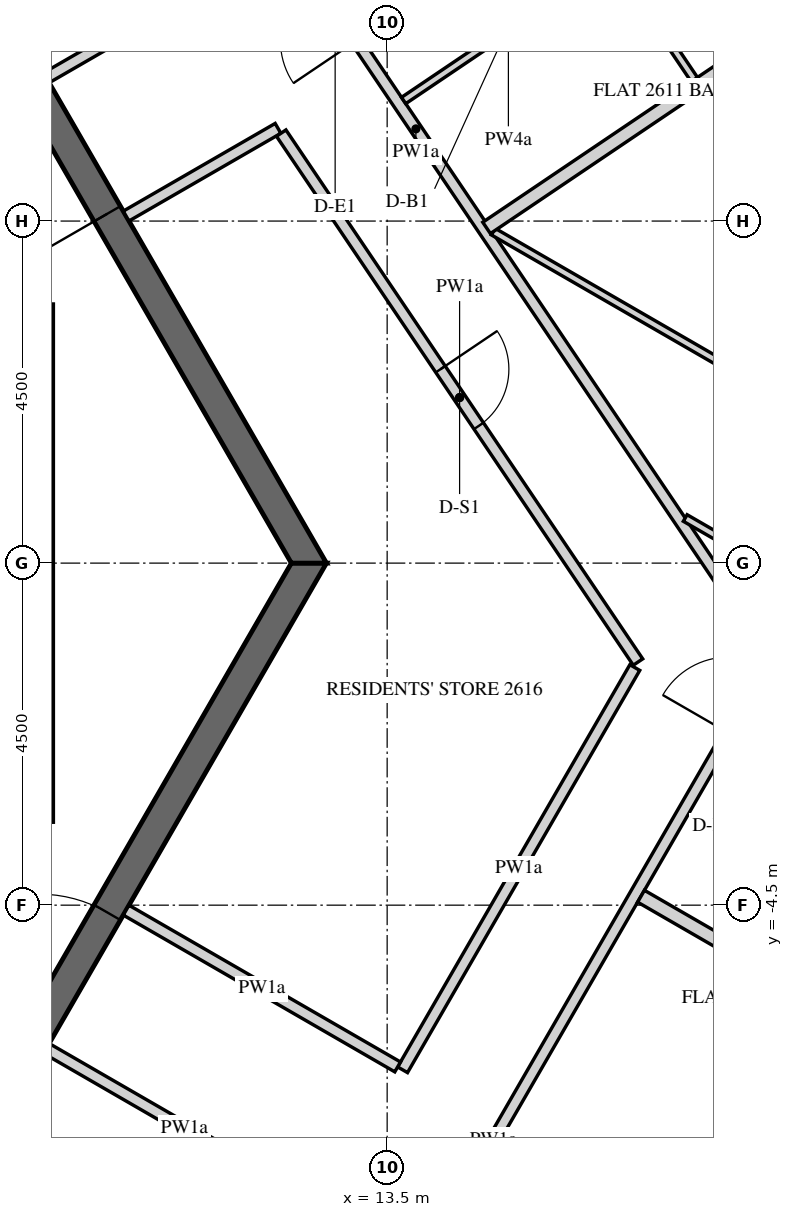
"""IFC4 building model, lengths in metres.
Left out: names, types, materials, properties, quantities, classifications, styles, units other than length and angle.
Written with IfcOpenShell. Run it as: python <this file> out.ifc"""

import sys

from ifc_helpers import new_model, si_unit, direction, frame, frame_2d, origin, place, context, subcontext, project, spatial, polyline, rectangle, outline, extrude, element, fill, save


model = new_model("IFC4")
c1 = context("Model", 3, precision=1e-05, world=origin(), true_north=direction((0.0, 1.0)))
c2 = subcontext(c1, "Body", "Model", "MODEL_VIEW")
j1 = project(units=[si_unit("LENGTHUNIT", "METRE"), si_unit("PLANEANGLEUNIT", "RADIAN")], contexts=[c1])
p1 = place(None, origin())
s1 = spatial("IfcSite", under=j1, at=p1, CompositionType="ELEMENT")
p2 = place(p1, origin())
s2 = spatial("IfcBuilding", under=s1, at=p2, CompositionType="ELEMENT")
p3 = place(p2, frame((0.0, 0.0, 334.2)))
s3 = spatial("IfcBuildingStorey", under=s2, at=p3, CompositionType="ELEMENT", Elevation=334.2)
p4 = place(p3, frame((16.451, -23.005, -0.15), z_axis=(0.0, 0.0, 1.0), x_axis=(0.500003737743, 0.866023245787, 0.0)))
e1 = element("IfcWall", 1, at=p4, inside=s3, PredefinedType="SOLIDWALL", context=c2, shape_type="SweptSolid", body=[
    extrude(outline(polyline([(-0.021, -0.25), (25.468, -0.25), (25.421, 0.25), (0.021, 0.25), (-0.021, -0.25)])), origin(), (0.0, 0.0, 1.0), 3.75),
])
p5 = place(p4, frame((2.522, 0.0, 0.75)))
e2 = element("IfcOpeningElement", 2, at=p5, cuts=e1, PredefinedType="OPENING", context=c2, shape_type="SweptSolid", body=[
    extrude(rectangle(XDim=2.4, YDim=2.7, at=frame_2d((1.2, 1.35))), frame((0.0, 0.26, 0.0), z_axis=(0.0, -1.0, 0.0), x_axis=(1.0, 0.0, 0.0)), (0.0, 0.0, 1.0), 0.52),
])
p6 = place(p4, frame((6.122, 0.0, 0.75)))
e3 = element("IfcOpeningElement", 3, at=p6, cuts=e1, PredefinedType="OPENING", context=c2, shape_type="SweptSolid", body=[
    extrude(rectangle(XDim=2.4, YDim=2.7, at=frame_2d((1.2, 1.35))), frame((0.0, 0.26, 0.0), z_axis=(0.0, -1.0, 0.0), x_axis=(1.0, 0.0, 0.0)), (0.0, 0.0, 1.0), 0.52),
])
p7 = place(p4, frame((9.722, 0.0, 0.75)))
e4 = element("IfcOpeningElement", 4, at=p7, cuts=e1, PredefinedType="OPENING", context=c2, shape_type="SweptSolid", body=[
    extrude(rectangle(XDim=2.4, YDim=2.7, at=frame_2d((1.2, 1.35))), frame((0.0, 0.26, 0.0), z_axis=(0.0, -1.0, 0.0), x_axis=(1.0, 0.0, 0.0)), (0.0, 0.0, 1.0), 0.52),
])
p8 = place(p4, frame((13.323, 0.0, 0.75)))
e5 = element("IfcOpeningElement", 5, at=p8, cuts=e1, PredefinedType="OPENING", context=c2, shape_type="SweptSolid", body=[
    extrude(rectangle(XDim=2.4, YDim=2.7, at=frame_2d((1.2, 1.35))), frame((0.0, 0.26, 0.0), z_axis=(0.0, -1.0, 0.0), x_axis=(1.0, 0.0, 0.0)), (0.0, 0.0, 1.0), 0.52),
])
p9 = place(p4, frame((16.922, 0.0, 0.75)))
e6 = element("IfcOpeningElement", 6, at=p9, cuts=e1, PredefinedType="OPENING", context=c2, shape_type="SweptSolid", body=[
    extrude(rectangle(XDim=2.4, YDim=2.7, at=frame_2d((1.2, 1.35))), frame((0.0, 0.26, 0.0), z_axis=(0.0, -1.0, 0.0), x_axis=(1.0, 0.0, 0.0)), (0.0, 0.0, 1.0), 0.52),
])
p10 = place(p4, frame((20.522, 0.0, 0.75)))
e7 = element("IfcOpeningElement", 7, at=p10, cuts=e1, PredefinedType="OPENING", context=c2, shape_type="SweptSolid", body=[
    extrude(rectangle(XDim=2.4, YDim=2.7, at=frame_2d((1.2, 1.35))), frame((0.0, 0.26, 0.0), z_axis=(0.0, -1.0, 0.0), x_axis=(1.0, 0.0, 0.0)), (0.0, 0.0, 1.0), 0.52),
])
p11 = place(p3, frame((26.706, 2.879, -0.15), z_axis=(0.0, 0.0, 1.0), x_axis=(-0.559197891507, 0.829034208061, 0.0)))
e8 = element("IfcWall", 8, at=p11, inside=s3, PredefinedType="SOLIDWALL", context=c2, shape_type="SweptSolid", body=[
    extrude(outline(polyline([(0.25, -0.25), (22.795, -0.25), (23.295, 0.25), (-0.25, 0.25), (0.25, -0.25)])), origin(), (0.0, 0.0, 1.0), 3.75),
])
p12 = place(p11, frame((1.323, 0.0, 1.05)))
e9 = element("IfcOpeningElement", 9, at=p12, cuts=e8, PredefinedType="OPENING", context=c2, shape_type="SweptSolid", body=[
    extrude(rectangle(XDim=0.9, YDim=1.5, at=frame_2d((0.45, 0.75))), frame((0.0, 0.26, 0.0), z_axis=(0.0, -1.0, 0.0), x_axis=(1.0, 0.0, 0.0)), (0.0, 0.0, 1.0), 0.52),
])
p13 = place(p11, frame((2.522, 0.0, 0.15)))
e10 = element("IfcOpeningElement", 10, at=p13, cuts=e8, PredefinedType="OPENING", context=c2, shape_type="SweptSolid", body=[
    extrude(rectangle(XDim=1.2, YDim=2.4, at=frame_2d((0.6, 1.2))), frame((0.0, 0.26, 0.0), z_axis=(0.0, -1.0, 0.0), x_axis=(1.0, 0.0, 0.0)), (0.0, 0.0, 1.0), 0.52),
])
p14 = place(p11, frame((4.922, 0.0, 1.05)))
e11 = element("IfcOpeningElement", 11, at=p14, cuts=e8, PredefinedType="OPENING", context=c2, shape_type="SweptSolid", body=[
    extrude(rectangle(XDim=0.9, YDim=1.5, at=frame_2d((0.45, 0.75))), frame((0.0, 0.26, 0.0), z_axis=(0.0, -1.0, 0.0), x_axis=(1.0, 0.0, 0.0)), (0.0, 0.0, 1.0), 0.52),
])
p15 = place(p11, frame((6.122, 0.0, 0.15)))
e12 = element("IfcOpeningElement", 12, at=p15, cuts=e8, PredefinedType="OPENING", context=c2, shape_type="SweptSolid", body=[
    extrude(rectangle(XDim=1.2, YDim=2.4, at=frame_2d((0.6, 1.2))), frame((0.0, 0.26, 0.0), z_axis=(0.0, -1.0, 0.0), x_axis=(1.0, 0.0, 0.0)), (0.0, 0.0, 1.0), 0.52),
])
p16 = place(p11, frame((8.522, 0.0, 1.05)))
e13 = element("IfcOpeningElement", 13, at=p16, cuts=e8, PredefinedType="OPENING", context=c2, shape_type="SweptSolid", body=[
    extrude(rectangle(XDim=0.9, YDim=1.5, at=frame_2d((0.45, 0.75))), frame((0.0, 0.26, 0.0), z_axis=(0.0, -1.0, 0.0), x_axis=(1.0, 0.0, 0.0)), (0.0, 0.0, 1.0), 0.52),
])
p17 = place(p11, frame((9.722, 0.0, 0.15)))
e14 = element("IfcOpeningElement", 14, at=p17, cuts=e8, PredefinedType="OPENING", context=c2, shape_type="SweptSolid", body=[
    extrude(rectangle(XDim=1.2, YDim=2.4, at=frame_2d((0.6, 1.2))), frame((0.0, 0.26, 0.0), z_axis=(0.0, -1.0, 0.0), x_axis=(1.0, 0.0, 0.0)), (0.0, 0.0, 1.0), 0.52),
])
p18 = place(p11, frame((12.122, 0.0, 1.05)))
e15 = element("IfcOpeningElement", 15, at=p18, cuts=e8, PredefinedType="OPENING", context=c2, shape_type="SweptSolid", body=[
    extrude(rectangle(XDim=0.9, YDim=1.5, at=frame_2d((0.45, 0.75))), frame((0.0, 0.26, 0.0), z_axis=(0.0, -1.0, 0.0), x_axis=(1.0, 0.0, 0.0)), (0.0, 0.0, 1.0), 0.52),
])
p19 = place(p11, frame((13.323, 0.0, 0.15)))
e16 = element("IfcOpeningElement", 16, at=p19, cuts=e8, PredefinedType="OPENING", context=c2, shape_type="SweptSolid", body=[
    extrude(rectangle(XDim=1.2, YDim=2.4, at=frame_2d((0.6, 1.2))), frame((0.0, 0.26, 0.0), z_axis=(0.0, -1.0, 0.0), x_axis=(1.0, 0.0, 0.0)), (0.0, 0.0, 1.0), 0.52),
])
p20 = place(p11, frame((15.722, 0.0, 1.05)))
e17 = element("IfcOpeningElement", 17, at=p20, cuts=e8, PredefinedType="OPENING", context=c2, shape_type="SweptSolid", body=[
    extrude(rectangle(XDim=0.9, YDim=1.5, at=frame_2d((0.45, 0.75))), frame((0.0, 0.26, 0.0), z_axis=(0.0, -1.0, 0.0), x_axis=(1.0, 0.0, 0.0)), (0.0, 0.0, 1.0), 0.52),
])
p21 = place(p11, frame((16.922, 0.0, 0.15)))
e18 = element("IfcOpeningElement", 18, at=p21, cuts=e8, PredefinedType="OPENING", context=c2, shape_type="SweptSolid", body=[
    extrude(rectangle(XDim=1.2, YDim=2.4, at=frame_2d((0.6, 1.2))), frame((0.0, 0.26, 0.0), z_axis=(0.0, -1.0, 0.0), x_axis=(1.0, 0.0, 0.0)), (0.0, 0.0, 1.0), 0.52),
])
p22 = place(p11, frame((19.323, 0.0, 1.05)))
e19 = element("IfcOpeningElement", 19, at=p22, cuts=e8, PredefinedType="OPENING", context=c2, shape_type="SweptSolid", body=[
    extrude(rectangle(XDim=0.9, YDim=1.5, at=frame_2d((0.45, 0.75))), frame((0.0, 0.26, 0.0), z_axis=(0.0, -1.0, 0.0), x_axis=(1.0, 0.0, 0.0)), (0.0, 0.0, 1.0), 0.52),
])
p23 = place(p11, frame((20.522, 0.0, 0.15)))
e20 = element("IfcOpeningElement", 20, at=p23, cuts=e8, PredefinedType="OPENING", context=c2, shape_type="SweptSolid", body=[
    extrude(rectangle(XDim=1.2, YDim=2.4, at=frame_2d((0.6, 1.2))), frame((0.0, 0.26, 0.0), z_axis=(0.0, -1.0, 0.0), x_axis=(1.0, 0.0, 0.0)), (0.0, 0.0, 1.0), 0.52),
])
p24 = place(p3, frame((6.235, -10.8, -0.15), z_axis=(0.0, 0.0, 1.0), x_axis=(0.499996419489, 0.866027470984, 0.0)))
e21 = element("IfcWall", 21, at=p24, inside=s3, PredefinedType="SHEAR", context=c2, shape_type="SweptSolid", body=[
    extrude(outline(polyline([(-0.115, -0.2), (12.586, -0.2), (12.355, 0.2), (0.115, 0.2), (-0.115, -0.2)])), origin(), (0.0, 0.0, 1.0), 3.75),
])
p25 = place(p24, frame((5.364, 0.0, 0.15)))
e22 = element("IfcOpeningElement", 22, at=p25, cuts=e21, PredefinedType="OPENING", context=c2, shape_type="SweptSolid", body=[
    extrude(rectangle(XDim=1.8, YDim=2.4, at=frame_2d((0.9, 1.2))), frame((0.0, 0.21, 0.0), z_axis=(0.0, -1.0, 0.0), x_axis=(1.0, 0.0, 0.0)), (0.0, 0.0, 1.0), 0.42),
])
p26 = place(p3, frame((12.471, 0.0, -0.15), z_axis=(0.0, 0.0, 1.0), x_axis=(-0.499996419489, 0.866027470984, 0.0)))
e23 = element("IfcWall", 23, at=p26, inside=s3, PredefinedType="SHEAR", context=c2, shape_type="SweptSolid", body=[
    extrude(outline(polyline([(-0.115, -0.2), (12.586, -0.2), (12.355, 0.2), (0.115, 0.2), (-0.115, -0.2)])), origin(), (0.0, 0.0, 1.0), 3.75),
])
p27 = place(p26, frame((5.306, 0.0, 0.15)))
e24 = element("IfcOpeningElement", 24, at=p27, cuts=e23, PredefinedType="OPENING", context=c2, shape_type="SweptSolid", body=[
    extrude(rectangle(XDim=1.8, YDim=2.4, at=frame_2d((0.9, 1.2))), frame((0.0, 0.21, 0.0), z_axis=(0.0, -1.0, 0.0), x_axis=(1.0, 0.0, 0.0)), (0.0, 0.0, 1.0), 0.42),
])
p28 = place(p3, frame((11.229, -13.951, 0.0), z_axis=(0.0, 0.0, 1.0), x_axis=(0.499997948852, 0.866026588012, 0.0)))
e25 = element("IfcWall", 25, at=p28, inside=s3, PredefinedType="PARTITIONING", context=c2, shape_type="SweptSolid", body=[
    extrude(rectangle(XDim=14.677, YDim=0.15, at=frame_2d((7.339, 0.0))), origin(), (0.0, 0.0, 1.0), 2.838),
])
p29 = place(p28, frame((0.4, 0.0, 0.0)))
e26 = element("IfcOpeningElement", 26, at=p29, cuts=e25, PredefinedType="OPENING", context=c2, shape_type="SweptSolid", body=[
    extrude(rectangle(XDim=1.0, YDim=2.1, at=frame_2d((0.5, 1.05))), frame((0.0, 0.085, 0.0), z_axis=(0.0, -1.0, 0.0), x_axis=(1.0, 0.0, 0.0)), (0.0, 0.0, 1.0), 0.17),
])
p30 = place(p28, frame((13.527, 0.0, 0.0)))
e27 = element("IfcOpeningElement", 27, at=p30, cuts=e25, PredefinedType="OPENING", context=c2, shape_type="SweptSolid", body=[
    extrude(rectangle(XDim=1.0, YDim=2.1, at=frame_2d((0.5, 1.05))), frame((0.0, 0.085, 0.0), z_axis=(0.0, -1.0, 0.0), x_axis=(1.0, 0.0, 0.0)), (0.0, 0.0, 1.0), 0.17),
])
p31 = place(p3, frame((18.521, -1.171, 0.0), z_axis=(0.0, 0.0, 1.0), x_axis=(-0.559191021435, 0.829038842001, 0.0)))
e28 = element("IfcWall", 28, at=p31, inside=s3, PredefinedType="PARTITIONING", context=c2, shape_type="SweptSolid", body=[
    extrude(rectangle(XDim=16.605, YDim=0.15, at=frame_2d((8.303, 0.0))), origin(), (0.0, 0.0, 1.0), 2.838),
])
p32 = place(p31, frame((9.703, 0.0, 0.0)))
e29 = element("IfcOpeningElement", 29, at=p32, cuts=e28, PredefinedType="OPENING", context=c2, shape_type="SweptSolid", body=[
    extrude(rectangle(XDim=1.0, YDim=2.1, at=frame_2d((0.5, 1.05))), frame((0.0, 0.085, 0.0), z_axis=(0.0, -1.0, 0.0), x_axis=(1.0, 0.0, 0.0)), (0.0, 0.0, 1.0), 0.17),
])
p33 = place(p3, frame((9.016, -6.384, 0.0), z_axis=(0.0, 0.0, 1.0), x_axis=(0.866023935413, -0.500002543286, 0.0)))
e30 = element("IfcWall", 30, at=p33, inside=s3, PredefinedType="PARTITIONING", context=c2, shape_type="SweptSolid", body=[
    extrude(rectangle(XDim=4.2, YDim=0.15, at=frame_2d((2.1, 0.0))), origin(), (0.0, 0.0, 1.0), 2.838),
])
p34 = place(p3, frame((10.066, 4.566, 0.0), z_axis=(0.0, 0.0, 1.0), x_axis=(0.866034075723, 0.499984979461, 0.0)))
e31 = element("IfcWall", 31, at=p34, inside=s3, PredefinedType="PARTITIONING", context=c2, shape_type="SweptSolid", body=[
    extrude(rectangle(XDim=2.308, YDim=0.15, at=frame_2d((1.154, 0.0))), origin(), (0.0, 0.0, 1.0), 2.838),
])
p35 = place(p3, frame((12.106, 5.657, 0.0), z_axis=(0.0, 0.0, 1.0), x_axis=(0.559202573837, -0.829031049728, 0.0)))
e32 = element("IfcWall", 32, at=p35, inside=s3, PredefinedType="PARTITIONING", context=c2, shape_type="SweptSolid", body=[
    extrude(rectangle(XDim=8.394, YDim=0.15, at=frame_2d((4.197, 0.0))), origin(), (0.0, 0.0, 1.0), 2.838),
])
p36 = place(p35, frame((3.747, 0.0, 0.0)))
e33 = element("IfcOpeningElement", 33, at=p36, cuts=e32, PredefinedType="OPENING", context=c2, shape_type="SweptSolid", body=[
    extrude(rectangle(XDim=0.9, YDim=2.1, at=frame_2d((0.45, 1.05))), frame((0.0, 0.085, 0.0), z_axis=(0.0, -1.0, 0.0), x_axis=(1.0, 0.0, 0.0)), (0.0, 0.0, 1.0), 0.17),
])
p37 = place(p3, frame((16.758, -1.374, 0.0), z_axis=(0.0, 0.0, 1.0), x_axis=(-0.499980689202, -0.866036552592, 0.0)))
e34 = element("IfcWall", 34, at=p37, inside=s3, PredefinedType="PARTITIONING", context=c2, shape_type="SweptSolid", body=[
    extrude(rectangle(XDim=6.111, YDim=0.15, at=frame_2d((3.055, 0.0))), origin(), (0.0, 0.0, 1.0), 2.838),
])
p38 = place(p3, frame((13.638, -6.628, 0.0), z_axis=(0.0, 0.0, 1.0), x_axis=(-0.866034795751, 0.499983732284, 0.0)))
e35 = element("IfcWall", 35, at=p38, inside=s3, PredefinedType="PARTITIONING", context=c2, shape_type="SweptSolid", body=[
    extrude(rectangle(XDim=4.125, YDim=0.15, at=frame_2d((2.062, 0.0))), origin(), (0.0, 0.0, 1.0), 2.838),
])
p39 = place(p3, frame((10.822, 7.427, 0.0), z_axis=(0.0, 0.0, 1.0), x_axis=(-0.866016009309, -0.500016271356, 0.0)))
e36 = element("IfcWall", 36, at=p39, inside=s3, PredefinedType="PARTITIONING", context=c2, shape_type="SweptSolid", body=[
    extrude(rectangle(XDim=2.086, YDim=0.15, at=frame_2d((1.043, 0.0))), origin(), (0.0, 0.0, 1.0), 2.838),
])
p40 = place(p3, frame((24.396, -8.745, 0.0), z_axis=(0.0, 0.0, 1.0), x_axis=(-0.866018297078, 0.500012308975, 0.0)))
e37 = element("IfcWall", 37, at=p40, inside=s3, PredefinedType="PARTITIONING", context=c2, shape_type="SweptSolid", body=[
    extrude(rectangle(XDim=8.725, YDim=0.18, at=frame_2d((4.362, 0.0))), origin(), (0.0, 0.0, 1.0), 2.838),
])
p41 = place(p3, frame((14.896, 4.361, 0.0), z_axis=(0.0, 0.0, 1.0), x_axis=(0.866020874699, -0.500007844523, 0.0)))
e38 = element("IfcWall", 38, at=p41, inside=s3, PredefinedType="PARTITIONING", context=c2, shape_type="SweptSolid", body=[
    extrude(rectangle(XDim=9.38, YDim=0.1, at=frame_2d((4.69, 0.0))), origin(), (0.0, 0.0, 1.0), 2.838),
])
p42 = place(p3, frame((22.069, 9.307, 0.0), z_axis=(0.0, 0.0, 1.0), x_axis=(-0.829040270775, -0.559188903174, 0.0)))
e39 = element("IfcWall", 39, at=p42, inside=s3, PredefinedType="PARTITIONING", context=c2, shape_type="SweptSolid", body=[
    extrude(rectangle(XDim=8.758, YDim=0.18, at=frame_2d((4.379, 0.0))), origin(), (0.0, 0.0, 1.0), 2.838),
])
p43 = place(p3, frame((22.02, -2.061, 0.0), z_axis=(0.0, 0.0, 1.0), x_axis=(-0.866041630335, 0.499971893737, 0.0)))
e40 = element("IfcWall", 40, at=p43, inside=s3, PredefinedType="PARTITIONING", context=c2, shape_type="SweptSolid", body=[
    extrude(rectangle(XDim=5.309, YDim=0.1, at=frame_2d((2.655, 0.0))), origin(), (0.0, 0.0, 1.0), 2.838),
])
p44 = place(p43, frame((1.3, 0.0, 0.0)))
e41 = element("IfcOpeningElement", 41, at=p44, cuts=e40, PredefinedType="OPENING", context=c2, shape_type="SweptSolid", body=[
    extrude(rectangle(XDim=0.8, YDim=2.1, at=frame_2d((0.4, 1.05))), frame((0.0, 0.06, 0.0), z_axis=(0.0, -1.0, 0.0), x_axis=(1.0, 0.0, 0.0)), (0.0, 0.0, 1.0), 0.12),
])
p45 = place(p3, frame((13.717, 6.086, 0.0), z_axis=(0.0, 0.0, 1.0), x_axis=(0.829067379225, 0.559148710725, 0.0)))
e42 = element("IfcWall", 42, at=p45, inside=s3, PredefinedType="PARTITIONING", context=c2, shape_type="SweptSolid", body=[
    extrude(rectangle(XDim=3.325, YDim=0.1, at=frame_2d((1.663, 0.0))), origin(), (0.0, 0.0, 1.0), 2.838),
])
p46 = place(p45, frame((1.225, 0.0, 0.0)))
e43 = element("IfcOpeningElement", 43, at=p46, cuts=e42, PredefinedType="OPENING", context=c2, shape_type="SweptSolid", body=[
    extrude(rectangle(XDim=0.8, YDim=2.1, at=frame_2d((0.4, 1.05))), frame((0.0, 0.06, 0.0), z_axis=(0.0, -1.0, 0.0), x_axis=(1.0, 0.0, 0.0)), (0.0, 0.0, 1.0), 0.12),
])
p47 = place(p3, frame((17.541, 6.362, 0.0), z_axis=(0.0, 0.0, 1.0), x_axis=(-0.559110227504, 0.829093332201, 0.0)))
e44 = element("IfcWall", 44, at=p47, inside=s3, PredefinedType="PARTITIONING", context=c2, shape_type="SweptSolid", body=[
    extrude(rectangle(XDim=1.862, YDim=0.1, at=frame_2d((0.931, 0.0))), origin(), (0.0, 0.0, 1.0), 2.838),
])
p48 = place(p27, origin())
e45 = element("IfcDoor", 45, at=p48, inside=s3, OperationType="DOUBLE_DOOR_SINGLE_SWING", PredefinedType="DOOR", context=c2, shape_type="SweptSolid", body=[
    extrude(rectangle(XDim=1.8, YDim=2.4, at=frame_2d((0.9, 1.2))), frame((0.0, 0.025, 0.0), z_axis=(0.0, -1.0, 0.0), x_axis=(1.0, 0.0, 0.0)), (0.0, 0.0, 1.0), 0.05),
])
fill(e24, e45)
p49 = place(p25, origin())
e46 = element("IfcDoor", 46, at=p49, inside=s3, OperationType="DOUBLE_DOOR_SINGLE_SWING", PredefinedType="DOOR", context=c2, shape_type="SweptSolid", body=[
    extrude(rectangle(XDim=1.8, YDim=2.4, at=frame_2d((0.9, 1.2))), frame((0.0, 0.025, 0.0), z_axis=(0.0, -1.0, 0.0), x_axis=(1.0, 0.0, 0.0)), (0.0, 0.0, 1.0), 0.05),
])
fill(e22, e46)
p50 = place(p36, origin())
e47 = element("IfcDoor", 47, at=p50, inside=s3, OperationType="SINGLE_SWING_RIGHT", PredefinedType="DOOR", context=c2, shape_type="SweptSolid", body=[
    extrude(rectangle(XDim=0.9, YDim=2.1, at=frame_2d((0.45, 1.05))), frame((0.0, 0.025, 0.0), z_axis=(0.0, -1.0, 0.0), x_axis=(1.0, 0.0, 0.0)), (0.0, 0.0, 1.0), 0.05),
])
fill(e33, e47)
save(model, sys.argv[1])
